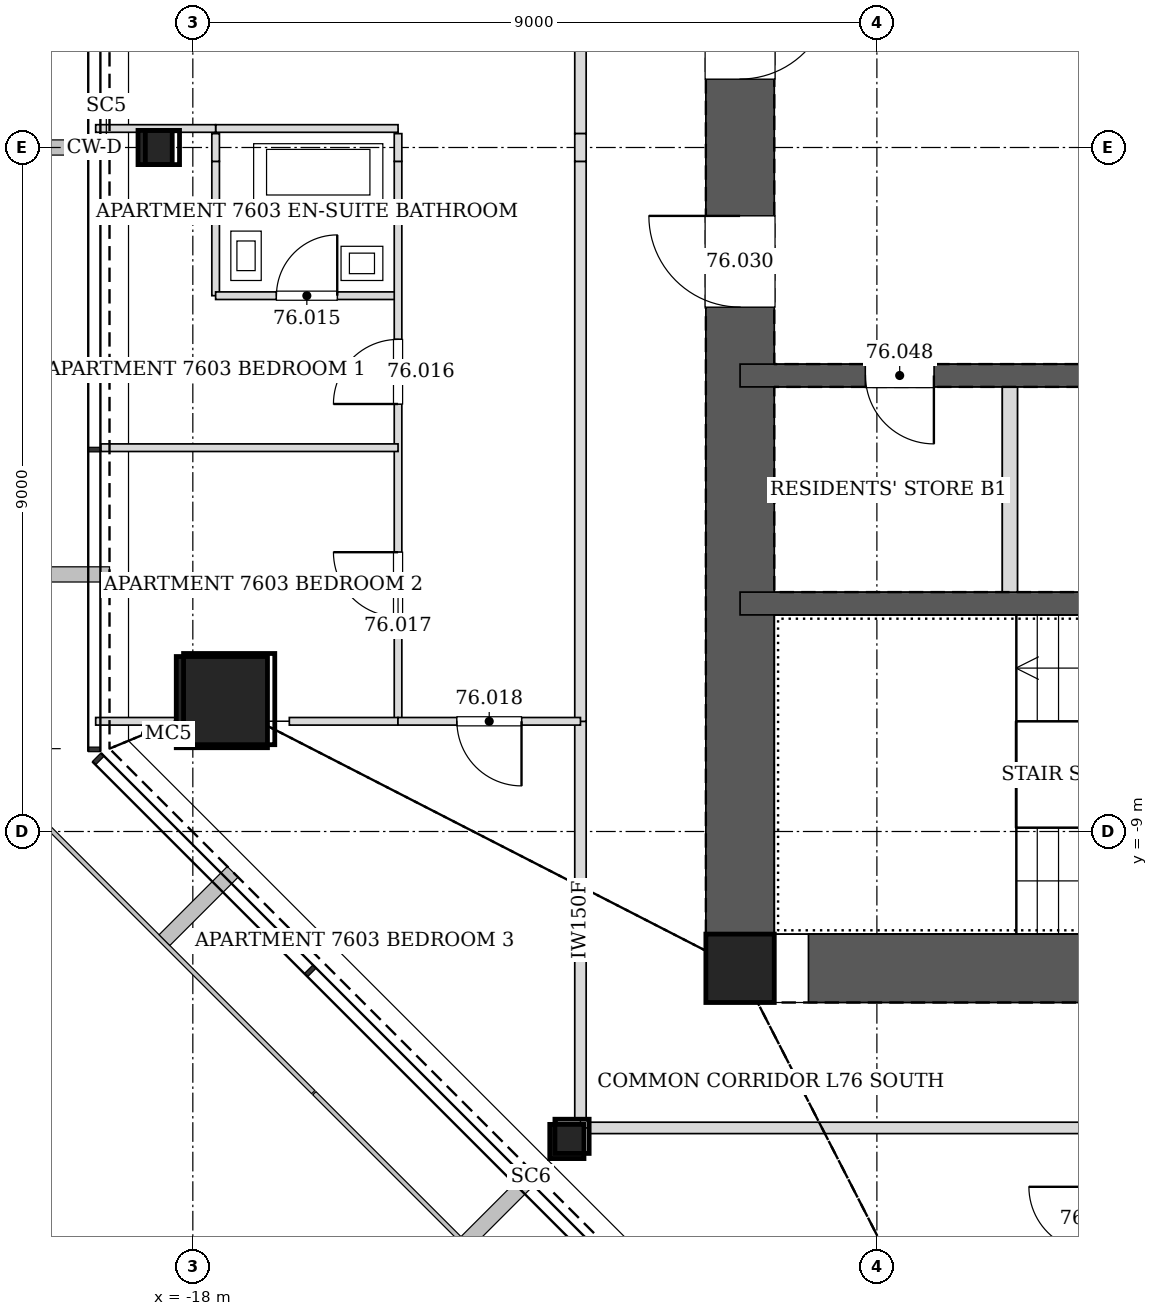
"""IFC4 building model, lengths in metres.
Left out: names, types, materials, properties, quantities, classifications, styles, units other than length and angle.
Written with IfcOpenShell. Run it as: python <this file> out.ifc"""

import sys

from ifc_helpers import new_model, si_unit, direction, frame, frame_2d, origin, origin_2d, place, context, subcontext, project, spatial, rectangle, hollow_rectangle, extrude, element, fill, save


model = new_model("IFC4")
c1 = context("Model", 3, precision=1e-05, world=origin(), true_north=direction((0.0, 1.0)))
c2 = subcontext(c1, "Body", "Model", "MODEL_VIEW")
j1 = project(units=[si_unit("LENGTHUNIT", "METRE"), si_unit("PLANEANGLEUNIT", "RADIAN")], contexts=[c1])
p1 = place(None, origin())
s1 = spatial("IfcSite", under=j1, at=p1, CompositionType="ELEMENT")
p2 = place(p1, origin())
s2 = spatial("IfcBuilding", under=s1, at=p2, CompositionType="ELEMENT")
p3 = place(p2, frame((0.0, 0.0, 308.2)))
s3 = spatial("IfcBuildingStorey", under=s2, at=p3, CompositionType="ELEMENT", Elevation=308.2)
p4 = place(p3, frame((-17.618, -7.298, 0.0), z_axis=(0.028277121884, 0.011698403216, 0.999531666202), x_axis=(-0.382282742426, 0.924045401938, 0.0)))
e1 = element("IfcColumn", 1, at=p4, inside=s3, PredefinedType="COLUMN", context=c2, shape_type="SweptSolid", body=[
    extrude(hollow_rectangle(XDim=1.2, YDim=1.2, WallThickness=0.055, at=origin_2d()), origin(), (0.0, 0.0, 1.0), 3.402),
])
for number, where, z_axis, x_axis in (
    (2, (-18.496, 0.0, 0.0), (0.028, 0.0, 1.0), (0.0, 1.0, 0.0)),
    (3, (-13.079, -13.079, 0.0), (0.02, 0.02, 1.0), (-0.707, 0.707, 0.0)),
):
    element("IfcColumn", number, at=place(p3, frame(where, z_axis=z_axis, x_axis=x_axis)), inside=s3, PredefinedType="COLUMN", context=c2, shape_type="SweptSolid", body=[
        extrude(hollow_rectangle(XDim=0.45, YDim=0.45, WallThickness=0.02, at=origin_2d()), origin(), (0.0, 0.0, 1.0), 3.402),
    ])
p5 = place(p3, frame((-10.8, -10.8, 0.0), z_axis=(0.0, 0.0, 1.0), x_axis=(1.0, 0.0, 0.0)))
e4 = element("IfcColumn", 4, at=p5, inside=s3, PredefinedType="COLUMN", context=c2, shape_type="SweptSolid", body=[
    extrude(hollow_rectangle(XDim=0.9, YDim=0.9, WallThickness=0.04, at=origin_2d()), origin(), (0.0, 0.0, 1.0), 3.4),
])
p6 = place(p3, frame((-10.8, -10.8, 0.0), z_axis=(0.0, 0.0, 1.0), x_axis=(1.0, 0.0, 0.0)))
e5 = element("IfcWall", 5, at=p6, inside=s3, PredefinedType="SOLIDWALL", context=c2, shape_type="SweptSolid", body=[
    extrude(rectangle(XDim=21.6, YDim=0.9, at=frame_2d((10.8, 0.0))), origin(), (0.0, 0.0, 1.0), 3.4),
])
p7 = place(p6, frame((10.05, 0.0, 0.0)))
e6 = element("IfcOpeningElement", 6, at=p7, cuts=e5, PredefinedType="OPENING", context=c2, shape_type="SweptSolid", body=[
    extrude(rectangle(XDim=1.5, YDim=2.1, at=frame_2d((0.75, 1.05))), frame((0.0, 0.46, 0.0), z_axis=(0.0, -1.0, 0.0), x_axis=(1.0, 0.0, 0.0)), (0.0, 0.0, 1.0), 0.92),
])
p8 = place(p6, frame((17.1, 0.0, 0.0)))
e7 = element("IfcOpeningElement", 7, at=p8, cuts=e5, PredefinedType="OPENING", context=c2, shape_type="SweptSolid", body=[
    extrude(rectangle(XDim=0.9, YDim=2.1, at=frame_2d((0.45, 1.05))), frame((0.0, 0.46, 0.0), z_axis=(0.0, -1.0, 0.0), x_axis=(1.0, 0.0, 0.0)), (0.0, 0.0, 1.0), 0.92),
])
p9 = place(p3, frame((-10.8, 10.8, 0.0), z_axis=(0.0, 0.0, 1.0), x_axis=(0.0, -1.0, 0.0)))
e8 = element("IfcWall", 8, at=p9, inside=s3, PredefinedType="SOLIDWALL", context=c2, shape_type="SweptSolid", body=[
    extrude(rectangle(XDim=21.6, YDim=0.9, at=frame_2d((10.8, 0.0))), origin(), (0.0, 0.0, 1.0), 3.4),
])
p10 = place(p9, frame((8.7, 0.0, 0.0)))
e9 = element("IfcOpeningElement", 9, at=p10, cuts=e8, PredefinedType="OPENING", context=c2, shape_type="SweptSolid", body=[
    extrude(rectangle(XDim=1.2, YDim=2.1, at=frame_2d((0.6, 1.05))), frame((0.0, 0.46, 0.0), z_axis=(0.0, -1.0, 0.0), x_axis=(1.0, 0.0, 0.0)), (0.0, 0.0, 1.0), 0.92),
])
p11 = place(p9, frame((11.7, 0.0, 0.0)))
e10 = element("IfcOpeningElement", 10, at=p11, cuts=e8, PredefinedType="OPENING", context=c2, shape_type="SweptSolid", body=[
    extrude(rectangle(XDim=1.2, YDim=2.1, at=frame_2d((0.6, 1.05))), frame((0.0, 0.46, 0.0), z_axis=(0.0, -1.0, 0.0), x_axis=(1.0, 0.0, 0.0)), (0.0, 0.0, 1.0), 0.92),
])
p12 = place(p3, frame((-10.8, -3.0, 0.0), z_axis=(0.0, 0.0, 1.0), x_axis=(1.0, 0.0, 0.0)))
e11 = element("IfcWall", 11, at=p12, inside=s3, PredefinedType="SOLIDWALL", context=c2, shape_type="SweptSolid", body=[
    extrude(rectangle(XDim=21.6, YDim=0.3, at=frame_2d((10.8, 0.0))), origin(), (0.0, 0.0, 1.0), 3.4),
])
p13 = place(p12, frame((4.55, 0.0, 0.0)))
e12 = element("IfcOpeningElement", 12, at=p13, cuts=e11, PredefinedType="OPENING", context=c2, shape_type="SweptSolid", body=[
    extrude(rectangle(XDim=0.9, YDim=2.1, at=frame_2d((0.45, 1.05))), frame((0.0, 0.16, 0.0), z_axis=(0.0, -1.0, 0.0), x_axis=(1.0, 0.0, 0.0)), (0.0, 0.0, 1.0), 0.32),
])
p14 = place(p12, frame((7.45, 0.0, 0.0)))
e13 = element("IfcOpeningElement", 13, at=p14, cuts=e11, PredefinedType="OPENING", context=c2, shape_type="SweptSolid", body=[
    extrude(rectangle(XDim=0.9, YDim=2.1, at=frame_2d((0.45, 1.05))), frame((0.0, 0.16, 0.0), z_axis=(0.0, -1.0, 0.0), x_axis=(1.0, 0.0, 0.0)), (0.0, 0.0, 1.0), 0.32),
])
p15 = place(p12, frame((1.65, 0.0, 0.0)))
e14 = element("IfcOpeningElement", 14, at=p15, cuts=e11, PredefinedType="OPENING", context=c2, shape_type="SweptSolid", body=[
    extrude(rectangle(XDim=0.9, YDim=2.1, at=frame_2d((0.45, 1.05))), frame((0.0, 0.16, 0.0), z_axis=(0.0, -1.0, 0.0), x_axis=(1.0, 0.0, 0.0)), (0.0, 0.0, 1.0), 0.32),
])
p16 = place(p12, frame((13.25, 0.0, 0.0)))
e15 = element("IfcOpeningElement", 15, at=p16, cuts=e11, PredefinedType="OPENING", context=c2, shape_type="SweptSolid", body=[
    extrude(rectangle(XDim=0.9, YDim=2.1, at=frame_2d((0.45, 1.05))), frame((0.0, 0.16, 0.0), z_axis=(0.0, -1.0, 0.0), x_axis=(1.0, 0.0, 0.0)), (0.0, 0.0, 1.0), 0.32),
])
p17 = place(p12, frame((16.05, 0.0, 0.0)))
e16 = element("IfcOpeningElement", 16, at=p17, cuts=e11, PredefinedType="OPENING", context=c2, shape_type="SweptSolid", body=[
    extrude(rectangle(XDim=1.1, YDim=2.1, at=frame_2d((0.55, 1.05))), frame((0.0, 0.16, 0.0), z_axis=(0.0, -1.0, 0.0), x_axis=(1.0, 0.0, 0.0)), (0.0, 0.0, 1.0), 0.32),
])
p18 = place(p12, frame((18.95, 0.0, 0.0)))
e17 = element("IfcOpeningElement", 17, at=p18, cuts=e11, PredefinedType="OPENING", context=c2, shape_type="SweptSolid", body=[
    extrude(rectangle(XDim=1.1, YDim=2.1, at=frame_2d((0.55, 1.05))), frame((0.0, 0.16, 0.0), z_axis=(0.0, -1.0, 0.0), x_axis=(1.0, 0.0, 0.0)), (0.0, 0.0, 1.0), 0.32),
])
p19 = place(p3, frame((-10.8, -6.0, 0.0), z_axis=(0.0, 0.0, 1.0), x_axis=(1.0, 0.0, 0.0)))
e18 = element("IfcWall", 18, at=p19, inside=s3, PredefinedType="SOLIDWALL", context=c2, shape_type="SweptSolid", body=[
    extrude(rectangle(XDim=21.6, YDim=0.3, at=frame_2d((10.8, 0.0))), origin(), (0.0, 0.0, 1.0), 3.4),
])
p20 = place(p19, frame((10.25, 0.0, 0.0)))
e19 = element("IfcOpeningElement", 19, at=p20, cuts=e18, PredefinedType="OPENING", context=c2, shape_type="SweptSolid", body=[
    extrude(rectangle(XDim=1.1, YDim=2.1, at=frame_2d((0.55, 1.05))), frame((0.0, 0.16, 0.0), z_axis=(0.0, -1.0, 0.0), x_axis=(1.0, 0.0, 0.0)), (0.0, 0.0, 1.0), 0.32),
])
p21 = place(p3, frame((-12.9, -7.549, 0.0), z_axis=(0.0, 0.0, 1.0), x_axis=(0.0, -1.0, 0.0)))
e20 = element("IfcWall", 20, at=p21, inside=s3, PredefinedType="PARTITIONING", context=c2, shape_type="SweptSolid", body=[
    extrude(rectangle(XDim=5.227, YDim=0.15, at=frame_2d((2.614, 0.0))), origin(), (0.0, 0.0, 1.0), 2.349),
])
p22 = place(p3, frame((-12.9, 2.051, 0.0), z_axis=(0.0, 0.0, 1.0), x_axis=(0.0, -1.0, 0.0)))
e21 = element("IfcWall", 21, at=p22, inside=s3, PredefinedType="PARTITIONING", context=c2, shape_type="SweptSolid", body=[
    extrude(rectangle(XDim=1.869, YDim=0.15, at=frame_2d((0.934, 0.0))), origin(), (0.0, 0.0, 1.0), 3.2),
])
p23 = place(p3, frame((-12.9, -0.182, 0.0), z_axis=(0.0, 0.0, 1.0), x_axis=(0.0, -1.0, 0.0)))
e22 = element("IfcWall", 22, at=p23, inside=s3, PredefinedType="PARTITIONING", context=c2, shape_type="SweptSolid", body=[
    extrude(rectangle(XDim=7.369, YDim=0.15, at=frame_2d((3.684, 0.0))), origin(), (0.0, 0.0, 1.0), 3.2),
])
p24 = place(p3, frame((-12.9, 0.182, 0.0), z_axis=(0.0, 0.0, 1.0), x_axis=(0.0, -1.0, 0.0)))
e23 = element("IfcWall", 23, at=p24, inside=s3, PredefinedType="PARTITIONING", context=c2, shape_type="SweptSolid", body=[
    extrude(rectangle(XDim=0.365, YDim=0.15, at=frame_2d((0.182, 0.0))), origin(), (0.0, 0.0, 1.0), 2.268),
])
p25 = place(p3, frame((-12.776, -12.9, 0.0), z_axis=(0.0, 0.0, 1.0), x_axis=(1.0, 0.0, 0.0)))
e24 = element("IfcWall", 24, at=p25, inside=s3, PredefinedType="PARTITIONING", context=c2, shape_type="SweptSolid", body=[
    extrude(rectangle(XDim=6.627, YDim=0.15, at=frame_2d((3.314, 0.0))), origin(), (0.0, 0.0, 1.0), 2.349),
])
p26 = place(p3, frame((-17.7, -0.182, 0.0), z_axis=(0.0, 0.0, 1.0), x_axis=(0.0, -1.0, 0.0)))
e25 = element("IfcWall", 25, at=p26, inside=s3, PredefinedType="PARTITIONING", context=c2, shape_type="SweptSolid", body=[
    extrude(rectangle(XDim=1.768, YDim=0.1, at=frame_2d((0.884, 0.0))), origin(), (0.0, 0.0, 1.0), 3.2),
])
p27 = place(p3, frame((-17.7, 0.182, 0.0), z_axis=(0.0, 0.0, 1.0), x_axis=(0.0, -1.0, 0.0)))
e26 = element("IfcWall", 26, at=p27, inside=s3, PredefinedType="PARTITIONING", context=c2, shape_type="SweptSolid", body=[
    extrude(rectangle(XDim=0.365, YDim=0.1, at=frame_2d((0.182, 0.0))), origin(), (0.0, 0.0, 1.0), 2.268),
])
p28 = place(p3, frame((-17.7, -1.95, 0.0), z_axis=(0.0, 0.0, 1.0), x_axis=(1.0, 0.0, 0.0)))
e27 = element("IfcWall", 27, at=p28, inside=s3, PredefinedType="PARTITIONING", context=c2, shape_type="SweptSolid", body=[
    extrude(rectangle(XDim=2.4, YDim=0.1, at=frame_2d((1.2, 0.0))), origin(), (0.0, 0.0, 1.0), 2.657),
])
p29 = place(p28, frame((0.8, 0.0, 0.0)))
e28 = element("IfcOpeningElement", 28, at=p29, cuts=e27, PredefinedType="OPENING", context=c2, shape_type="SweptSolid", body=[
    extrude(rectangle(XDim=0.8, YDim=2.1, at=frame_2d((0.4, 1.05))), frame((0.0, 0.06, 0.0), z_axis=(0.0, -1.0, 0.0), x_axis=(1.0, 0.0, 0.0)), (0.0, 0.0, 1.0), 0.12),
])
p30 = place(p3, frame((-15.3, -0.182, 0.0), z_axis=(0.0, 0.0, 1.0), x_axis=(0.0, -1.0, 0.0)))
e29 = element("IfcWall", 29, at=p30, inside=s3, PredefinedType="PARTITIONING", context=c2, shape_type="SweptSolid", body=[
    extrude(rectangle(XDim=7.368, YDim=0.1, at=frame_2d((3.684, 0.0))), origin(), (0.0, 0.0, 1.0), 3.2),
])
p31 = place(p30, frame((2.343, 0.0, 0.0)))
e30 = element("IfcOpeningElement", 30, at=p31, cuts=e29, PredefinedType="OPENING", context=c2, shape_type="SweptSolid", body=[
    extrude(rectangle(XDim=0.85, YDim=2.1, at=frame_2d((0.425, 1.05))), frame((0.0, 0.06, 0.0), z_axis=(0.0, -1.0, 0.0), x_axis=(1.0, 0.0, 0.0)), (0.0, 0.0, 1.0), 0.12),
])
p32 = place(p30, frame((5.143, 0.0, 0.0)))
e31 = element("IfcOpeningElement", 31, at=p32, cuts=e29, PredefinedType="OPENING", context=c2, shape_type="SweptSolid", body=[
    extrude(rectangle(XDim=0.85, YDim=2.1, at=frame_2d((0.425, 1.05))), frame((0.0, 0.06, 0.0), z_axis=(0.0, -1.0, 0.0), x_axis=(1.0, 0.0, 0.0)), (0.0, 0.0, 1.0), 0.12),
])
p33 = place(p3, frame((-15.3, -0.182, 0.0), z_axis=(0.0, 0.0, 1.0), x_axis=(0.0, 1.0, 0.0)))
e32 = element("IfcWall", 32, at=p33, inside=s3, PredefinedType="PARTITIONING", context=c2, shape_type="SweptSolid", body=[
    extrude(rectangle(XDim=0.365, YDim=0.1, at=frame_2d((0.182, 0.0))), origin(), (0.0, 0.0, 1.0), 2.268),
])
p34 = place(p3, frame((-15.3, 0.25, 0.0), z_axis=(0.0, 0.0, 1.0), x_axis=(-1.0, 0.0, 0.0)))
e33 = element("IfcWall", 33, at=p34, inside=s3, PredefinedType="PARTITIONING", context=c2, shape_type="SweptSolid", body=[
    extrude(rectangle(XDim=2.4, YDim=0.1, at=frame_2d((1.2, 0.0))), origin(), (0.0, 0.0, 1.0), 2.657),
])
p35 = place(p3, frame((-19.211, -3.95, 0.0), z_axis=(0.0, 0.0, 1.0), x_axis=(1.0, 0.0, 0.0)))
e34 = element("IfcWall", 34, at=p35, inside=s3, PredefinedType="PARTITIONING", context=c2, shape_type="SweptSolid", body=[
    extrude(rectangle(XDim=3.911, YDim=0.1, at=frame_2d((1.956, 0.0))), origin(), (0.0, 0.0, 1.0), 2.657),
])
p36 = place(p3, frame((-17.7, 0.25, 0.0), z_axis=(0.0, 0.0, 1.0), x_axis=(-1.0, 0.0, 0.0)))
e35 = element("IfcWall", 35, at=p36, inside=s3, PredefinedType="PARTITIONING", context=c2, shape_type="SweptSolid", body=[
    extrude(rectangle(XDim=1.578, YDim=0.1, at=frame_2d((0.789, 0.0))), origin(), (0.0, 0.0, 1.0), 2.664),
])
p37 = place(p3, frame((-19.278, -7.55, 0.0), z_axis=(0.0, 0.0, 1.0), x_axis=(1.0, 0.0, 0.0)))
e36 = element("IfcWall", 36, at=p37, inside=s3, PredefinedType="PARTITIONING", context=c2, shape_type="SweptSolid", body=[
    extrude(rectangle(XDim=1.095, YDim=0.1, at=frame_2d((0.547, 0.0))), origin(), (0.0, 0.0, 1.0), 3.2),
])
p38 = place(p3, frame((-16.73, -7.55, 0.0), z_axis=(0.0, 0.0, 1.0), x_axis=(1.0, 0.0, 0.0)))
e37 = element("IfcWall", 37, at=p38, inside=s3, PredefinedType="PARTITIONING", context=c2, shape_type="SweptSolid", body=[
    extrude(rectangle(XDim=1.43, YDim=0.1, at=frame_2d((0.715, 0.0))), origin(), (0.0, 0.0, 1.0), 2.349),
])
p39 = place(p3, frame((-12.9, -7.55, 0.0), z_axis=(0.0, 0.0, 1.0), x_axis=(-1.0, 0.0, 0.0)))
e38 = element("IfcWall", 38, at=p39, inside=s3, PredefinedType="PARTITIONING", context=c2, shape_type="SweptSolid", body=[
    extrude(rectangle(XDim=2.401, YDim=0.1, at=frame_2d((1.201, 0.0))), origin(), (0.0, 0.0, 1.0), 2.588),
])
p40 = place(p39, frame((0.775, 0.0, 0.0)))
e39 = element("IfcOpeningElement", 39, at=p40, cuts=e38, PredefinedType="OPENING", context=c2, shape_type="SweptSolid", body=[
    extrude(rectangle(XDim=0.85, YDim=2.1, at=frame_2d((0.425, 1.05))), frame((0.0, 0.06, 0.0), z_axis=(0.0, -1.0, 0.0), x_axis=(1.0, 0.0, 0.0)), (0.0, 0.0, 1.0), 0.12),
])
p41 = place(p3, frame((-7.25, -5.85, 0.0), z_axis=(0.0, 0.0, 1.0), x_axis=(0.0, 1.0, 0.0)))
e40 = element("IfcWall", 40, at=p41, inside=s3, PredefinedType="PARTITIONING", context=c2, shape_type="SweptSolid", body=[
    extrude(rectangle(XDim=2.7, YDim=0.2, at=frame_2d((1.35, 0.0))), origin(), (0.0, 0.0, 1.0), 3.2),
])
p42 = place(p29, origin())
e41 = element("IfcDoor", 41, at=p42, inside=s3, OperationType="SINGLE_SWING_RIGHT", PredefinedType="DOOR", context=c2, shape_type="SweptSolid", body=[
    extrude(rectangle(XDim=0.8, YDim=2.1, at=frame_2d((0.4, 1.05))), frame((0.0, 0.025, 0.0), z_axis=(0.0, -1.0, 0.0), x_axis=(1.0, 0.0, 0.0)), (0.0, 0.0, 1.0), 0.05),
])
fill(e28, e41)
p43 = place(p31, frame((0.85, 0.0, 0.0), z_axis=(0.0, 0.0, 1.0), x_axis=(-1.0, 0.0, 0.0)))
e42 = element("IfcDoor", 42, at=p43, inside=s3, OperationType="SINGLE_SWING_LEFT", PredefinedType="DOOR", context=c2, shape_type="SweptSolid", body=[
    extrude(rectangle(XDim=0.85, YDim=2.1, at=frame_2d((0.425, 1.05))), frame((0.0, 0.025, 0.0), z_axis=(0.0, -1.0, 0.0), x_axis=(1.0, 0.0, 0.0)), (0.0, 0.0, 1.0), 0.05),
])
fill(e30, e42)
p44 = place(p32, frame((0.85, 0.0, 0.0), z_axis=(0.0, 0.0, 1.0), x_axis=(-1.0, 0.0, 0.0)))
e43 = element("IfcDoor", 43, at=p44, inside=s3, OperationType="SINGLE_SWING_RIGHT", PredefinedType="DOOR", context=c2, shape_type="SweptSolid", body=[
    extrude(rectangle(XDim=0.85, YDim=2.1, at=frame_2d((0.425, 1.05))), frame((0.0, 0.025, 0.0), z_axis=(0.0, -1.0, 0.0), x_axis=(1.0, 0.0, 0.0)), (0.0, 0.0, 1.0), 0.05),
])
fill(e31, e43)
p45 = place(p40, origin())
e44 = element("IfcDoor", 44, at=p45, inside=s3, OperationType="SINGLE_SWING_LEFT", PredefinedType="DOOR", context=c2, shape_type="SweptSolid", body=[
    extrude(rectangle(XDim=0.85, YDim=2.1, at=frame_2d((0.425, 1.05))), frame((0.0, 0.025, 0.0), z_axis=(0.0, -1.0, 0.0), x_axis=(1.0, 0.0, 0.0)), (0.0, 0.0, 1.0), 0.05),
])
fill(e39, e44)
p46 = place(p10, origin())
e45 = element("IfcDoor", 45, at=p46, inside=s3, OperationType="SINGLE_SWING_LEFT", PredefinedType="DOOR", context=c2, shape_type="SweptSolid", body=[
    extrude(rectangle(XDim=1.2, YDim=2.1, at=frame_2d((0.6, 1.05))), frame((0.0, 0.025, 0.0), z_axis=(0.0, -1.0, 0.0), x_axis=(1.0, 0.0, 0.0)), (0.0, 0.0, 1.0), 0.05),
])
fill(e9, e45)
p47 = place(p11, frame((1.2, 0.0, 0.0), z_axis=(0.0, 0.0, 1.0), x_axis=(-1.0, 0.0, 0.0)))
e46 = element("IfcDoor", 46, at=p47, inside=s3, OperationType="SINGLE_SWING_RIGHT", PredefinedType="DOOR", context=c2, shape_type="SweptSolid", body=[
    extrude(rectangle(XDim=1.2, YDim=2.1, at=frame_2d((0.6, 1.05))), frame((0.0, 0.025, 0.0), z_axis=(0.0, -1.0, 0.0), x_axis=(1.0, 0.0, 0.0)), (0.0, 0.0, 1.0), 0.05),
])
fill(e10, e46)
p48 = place(p15, frame((0.9, 0.0, 0.0), z_axis=(0.0, 0.0, 1.0), x_axis=(-1.0, 0.0, 0.0)))
e47 = element("IfcDoor", 47, at=p48, inside=s3, OperationType="SINGLE_SWING_LEFT", PredefinedType="DOOR", context=c2, shape_type="SweptSolid", body=[
    extrude(rectangle(XDim=0.9, YDim=2.1, at=frame_2d((0.45, 1.05))), frame((0.0, 0.025, 0.0), z_axis=(0.0, -1.0, 0.0), x_axis=(1.0, 0.0, 0.0)), (0.0, 0.0, 1.0), 0.05),
])
fill(e14, e47)
save(model, sys.argv[1])
